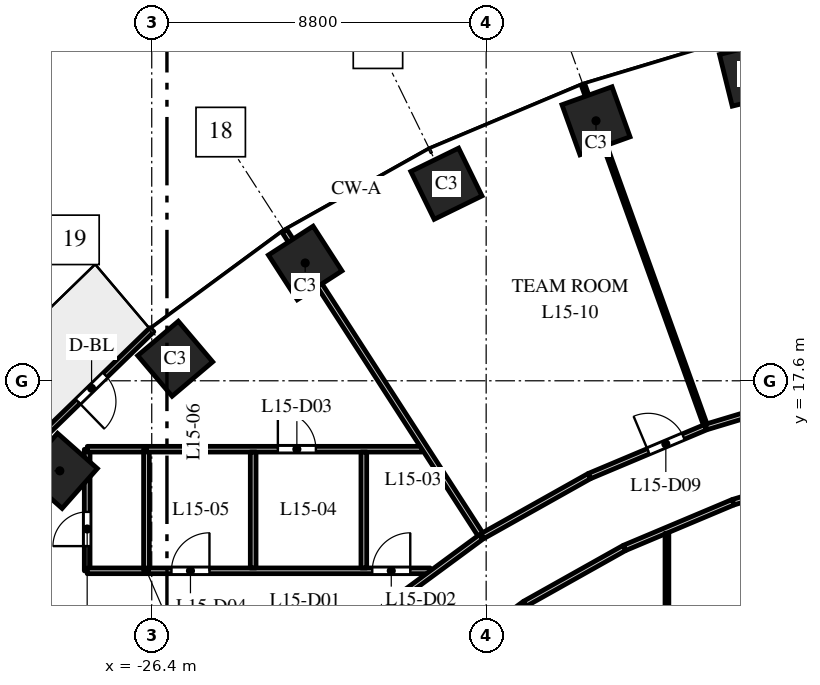
"""IFC4 building model, lengths in metres.
Left out: names, types, materials, properties, quantities, classifications, styles, units other than length and angle.
Written with IfcOpenShell. Run it as: python <this file> out.ifc"""

import sys

from ifc_helpers import new_model, si_unit, direction, frame, frame_2d, origin, origin_2d, place, context, subcontext, project, spatial, rectangle, extrude, element, fill, save


model = new_model("IFC4")
c1 = context("Model", 3, precision=1e-05, world=origin(), true_north=direction((0.0, 1.0)))
c2 = subcontext(c1, "Body", "Model", "MODEL_VIEW")
j1 = project(units=[si_unit("LENGTHUNIT", "METRE"), si_unit("PLANEANGLEUNIT", "RADIAN")], contexts=[c1])
p1 = place(None, origin())
s1 = spatial("IfcSite", under=j1, at=p1, CompositionType="ELEMENT")
p2 = place(p1, origin())
s2 = spatial("IfcBuilding", under=s1, at=p2, CompositionType="ELEMENT")
p3 = place(p2, frame((0.0, 0.0, 70.5)))
s3 = spatial("IfcBuildingStorey", under=s2, at=p3, CompositionType="ELEMENT", Elevation=70.5)
for number, where, z_axis, x_axis in (
    (1, (-10.613, 25.674, 0.0), (0.0, 0.0, 1.0), (-0.971, -0.24, 0.0)),
    (2, (-14.709, 24.441, 0.0), (0.0, 0.0, 1.0), (-0.941, -0.338, 0.0)),
    (3, (-18.646, 22.785, 0.0), (0.0, 0.0, 1.0), (-0.898, -0.439, 0.0)),
    (4, (-22.362, 20.7, 0.0), (0.0, 0.0, 1.0), (-0.84, -0.542, 0.0)),
    (5, (-25.783, 18.18, 0.0), (0.0, 0.0, 1.0), (-0.763, -0.646, 0.0)),
    (6, (-28.819, 15.23, 0.0), (0.0, 0.0, 1.0), (-0.663, -0.749, 0.0)),
):
    element("IfcColumn", number, at=place(p3, frame(where, z_axis=z_axis, x_axis=x_axis)), inside=s3, PredefinedType="COLUMN", context=c2, shape_type="SweptSolid", body=[
        extrude(rectangle(XDim=1.4, YDim=1.4, at=origin_2d()), origin(), (0.0, 0.0, 1.0), 4.0),
    ])
p4 = place(p3, frame((-26.396, 18.943, 0.0), z_axis=(0.0, 0.0, 1.0), x_axis=(-0.717214761864, -0.696852197647, 0.0)))
e7 = element("IfcWall", 7, at=p4, inside=s3, PredefinedType="STANDARD", context=c2, shape_type="SweptSolid", body=[
    extrude(rectangle(XDim=4.424, YDim=0.15, at=frame_2d((2.212, 0.0))), origin(), (0.0, 0.0, 1.0), 3.7),
])
p5 = place(p4, frame((1.712, 0.0, 0.0)))
e8 = element("IfcOpeningElement", 8, at=p5, cuts=e7, PredefinedType="OPENING", context=c2, shape_type="SweptSolid", body=[
    extrude(rectangle(XDim=1.0, YDim=2.4, at=frame_2d((0.5, 1.2))), frame((0.0, 0.085, 0.0), z_axis=(0.0, -1.0, 0.0), x_axis=(1.0, 0.0, 0.0)), (0.0, 0.0, 1.0), 0.17),
])
p6 = place(p3, frame((-28.099, 12.6, 0.0), z_axis=(0.0, 0.0, 1.0), x_axis=(0.0, 1.0, 0.0)))
e9 = element("IfcWall", 9, at=p6, inside=s3, PredefinedType="PARTITIONING", context=c2, shape_type="SweptSolid", body=[
    extrude(rectangle(XDim=3.196, YDim=0.15, at=frame_2d((1.598, 0.0))), origin(), (0.0, 0.0, 1.0), 2.85),
])
p7 = place(p6, frame((0.65, 0.0, 0.0)))
e10 = element("IfcOpeningElement", 10, at=p7, cuts=e9, PredefinedType="OPENING", context=c2, shape_type="SweptSolid", body=[
    extrude(rectangle(XDim=0.9, YDim=2.1, at=frame_2d((0.45, 1.05))), frame((0.0, 0.085, 0.0), z_axis=(0.0, -1.0, 0.0), x_axis=(1.0, 0.0, 0.0)), (0.0, 0.0, 1.0), 0.17),
])
p8 = place(p3, frame((-28.099, 12.6, 0.0), z_axis=(0.0, 0.0, 1.0), x_axis=(1.0, 0.0, 0.0)))
e11 = element("IfcWall", 11, at=p8, inside=s3, PredefinedType="PARTITIONING", context=c2, shape_type="SweptSolid", body=[
    extrude(rectangle(XDim=1.56, YDim=0.15, at=frame_2d((0.78, 0.0))), origin(), (0.0, 0.0, 1.0), 3.7),
])
p9 = place(p3, frame((-28.095, 15.8, 0.0), z_axis=(0.0, 0.0, 1.0), x_axis=(1.0, 0.0, 0.0)))
e12 = element("IfcWall", 12, at=p9, inside=s3, PredefinedType="PARTITIONING", context=c2, shape_type="SweptSolid", body=[
    extrude(rectangle(XDim=1.556, YDim=0.15, at=frame_2d((0.778, 0.0))), origin(), (0.0, 0.0, 1.0), 2.85),
])
p10 = place(p3, frame((-26.539, 12.6, 0.0), z_axis=(0.0, 0.0, 1.0), x_axis=(0.0, 1.0, 0.0)))
e13 = element("IfcWall", 13, at=p10, inside=s3, PredefinedType="PARTITIONING", context=c2, shape_type="SweptSolid", body=[
    extrude(rectangle(XDim=3.2, YDim=0.15, at=frame_2d((1.6, 0.0))), origin(), (0.0, 0.0, 1.0), 3.7),
])
p11 = place(p3, frame((-26.539, 12.6, 0.0), z_axis=(0.0, 0.0, 1.0), x_axis=(1.0, 0.0, 0.0)))
e14 = element("IfcWall", 14, at=p11, inside=s3, PredefinedType="PARTITIONING", context=c2, shape_type="SweptSolid", body=[
    extrude(rectangle(XDim=7.466, YDim=0.15, at=frame_2d((3.733, 0.0))), origin(), (0.0, 0.0, 1.0), 3.7),
])
p12 = place(p11, frame((5.942, 0.0, 0.0)))
e15 = element("IfcOpeningElement", 15, at=p12, cuts=e14, PredefinedType="OPENING", context=c2, shape_type="SweptSolid", body=[
    extrude(rectangle(XDim=1.0, YDim=2.1, at=frame_2d((0.5, 1.05))), frame((0.0, 0.085, 0.0), z_axis=(0.0, -1.0, 0.0), x_axis=(1.0, 0.0, 0.0)), (0.0, 0.0, 1.0), 0.17),
])
p13 = place(p11, frame((0.658, 0.0, 0.0)))
e16 = element("IfcOpeningElement", 16, at=p13, cuts=e14, PredefinedType="OPENING", context=c2, shape_type="SweptSolid", body=[
    extrude(rectangle(XDim=1.0, YDim=2.1, at=frame_2d((0.5, 1.05))), frame((0.0, 0.085, 0.0), z_axis=(0.0, -1.0, 0.0), x_axis=(1.0, 0.0, 0.0)), (0.0, 0.0, 1.0), 0.17),
])
p14 = place(p3, frame((-26.539, 15.8, 0.0), z_axis=(0.0, 0.0, 1.0), x_axis=(1.0, 0.0, 0.0)))
e17 = element("IfcWall", 17, at=p14, inside=s3, PredefinedType="PARTITIONING", context=c2, shape_type="SweptSolid", body=[
    extrude(rectangle(XDim=7.247, YDim=0.15, at=frame_2d((3.624, 0.0))), origin(), (0.0, 0.0, 1.0), 2.75),
])
p15 = place(p14, frame((3.458, 0.0, 0.0)))
e18 = element("IfcOpeningElement", 18, at=p15, cuts=e17, PredefinedType="OPENING", context=c2, shape_type="SweptSolid", body=[
    extrude(rectangle(XDim=1.0, YDim=2.1, at=frame_2d((0.5, 1.05))), frame((0.0, 0.085, 0.0), z_axis=(0.0, -1.0, 0.0), x_axis=(1.0, 0.0, 0.0)), (0.0, 0.0, 1.0), 0.17),
])
p16 = place(p3, frame((-23.731, 12.675, 0.0), z_axis=(0.0, 0.0, 1.0), x_axis=(0.0, 1.0, 0.0)))
e19 = element("IfcWall", 19, at=p16, inside=s3, PredefinedType="PARTITIONING", context=c2, shape_type="SweptSolid", body=[
    extrude(rectangle(XDim=3.05, YDim=0.15, at=frame_2d((1.525, 0.0))), origin(), (0.0, 0.0, 1.0), 3.7),
])
p17 = place(p3, frame((-22.905, 21.542, 0.0), z_axis=(0.0, 0.0, 1.0), x_axis=(0.542244314938, -0.840220865557, 0.0)))
e20 = element("IfcWall", 20, at=p17, inside=s3, PredefinedType="PARTITIONING", context=c2, shape_type="SweptSolid", body=[
    extrude(rectangle(XDim=9.564, YDim=0.15, at=frame_2d((4.782, 0.0))), origin(), (0.0, 0.0, 1.0), 2.85),
])
p18 = place(p3, frame((-21.135, 10.775, 0.0), z_axis=(0.0, 0.0, 1.0), x_axis=(0.717043956417, 0.697027951065, 0.0)))
e21 = element("IfcWall", 21, at=p18, inside=s3, PredefinedType="PARTITIONING", context=c2, shape_type="SweptSolid", body=[
    extrude(rectangle(XDim=1.244, YDim=0.15, at=frame_2d((0.622, 0.0))), origin(), (0.0, 0.0, 1.0), 3.7),
])
p19 = place(p3, frame((-20.819, 12.675, 0.0), z_axis=(0.0, 0.0, 1.0), x_axis=(0.0, 1.0, 0.0)))
e22 = element("IfcWall", 22, at=p19, inside=s3, PredefinedType="PARTITIONING", context=c2, shape_type="SweptSolid", body=[
    extrude(rectangle(XDim=3.05, YDim=0.15, at=frame_2d((1.525, 0.0))), origin(), (0.0, 0.0, 1.0), 2.75),
])
p20 = place(p3, frame((-20.243, 11.642, 0.0), z_axis=(0.0, 0.0, 1.0), x_axis=(0.805148342369, 0.593073475027, 0.0)))
e23 = element("IfcWall", 23, at=p20, inside=s3, PredefinedType="PARTITIONING", context=c2, shape_type="SweptSolid", body=[
    extrude(rectangle(XDim=3.117, YDim=0.15, at=frame_2d((1.559, 0.0))), origin(), (0.0, 0.0, 1.0), 2.75),
])
p21 = place(p3, frame((-18.083, 10.625, 0.0), z_axis=(0.0, 0.0, 1.0), x_axis=(0.805150898842, 0.593070004379, 0.0)))
e24 = element("IfcWall", 24, at=p21, inside=s3, PredefinedType="PARTITIONING", context=c2, shape_type="SweptSolid", body=[
    extrude(rectangle(XDim=1.872, YDim=0.15, at=frame_2d((0.936, 0.0))), origin(), (0.0, 0.0, 1.0), 2.75),
])
p22 = place(p3, frame((-17.699, 13.513, 0.0), z_axis=(0.0, 0.0, 1.0), x_axis=(0.872072163686, 0.489377299559, 0.0)))
e25 = element("IfcWall", 25, at=p22, inside=s3, PredefinedType="PARTITIONING", context=c2, shape_type="SweptSolid", body=[
    extrude(rectangle(XDim=3.227, YDim=0.15, at=frame_2d((1.613, 0.0))), origin(), (0.0, 0.0, 1.0), 3.7),
])
p23 = place(p3, frame((-16.576, 11.735, 0.0), z_axis=(0.0, 0.0, 1.0), x_axis=(0.872164226045, 0.489213207924, 0.0)))
e26 = element("IfcWall", 26, at=p23, inside=s3, PredefinedType="PARTITIONING", context=c2, shape_type="SweptSolid", body=[
    extrude(rectangle(XDim=2.998, YDim=0.15, at=frame_2d((1.499, 0.0))), origin(), (0.0, 0.0, 1.0), 2.75),
])
p24 = place(p3, frame((-15.048, 25.383, 0.0), z_axis=(0.0, 0.0, 1.0), x_axis=(0.338338680362, -0.941024408488, 0.0)))
e27 = element("IfcWall", 27, at=p24, inside=s3, PredefinedType="PARTITIONING", context=c2, shape_type="SweptSolid", body=[
    extrude(rectangle(XDim=9.559, YDim=0.1, at=frame_2d((4.779, 0.0))), origin(), (0.0, 0.0, 1.0), 2.85),
])
p25 = place(p3, frame((-14.885, 15.092, 0.0), z_axis=(0.0, 0.0, 1.0), x_axis=(0.921844706698, 0.387559462189, 0.0)))
e28 = element("IfcWall", 28, at=p25, inside=s3, PredefinedType="PARTITIONING", context=c2, shape_type="SweptSolid", body=[
    extrude(rectangle(XDim=3.313, YDim=0.15, at=frame_2d((1.656, 0.0))), origin(), (0.0, 0.0, 1.0), 2.85),
])
p26 = place(p25, frame((1.684, 0.0, 0.0)))
e29 = element("IfcOpeningElement", 29, at=p26, cuts=e28, PredefinedType="OPENING", context=c2, shape_type="SweptSolid", body=[
    extrude(rectangle(XDim=1.0, YDim=2.1, at=frame_2d((0.5, 1.05))), frame((0.0, 0.085, 0.0), z_axis=(0.0, -1.0, 0.0), x_axis=(1.0, 0.0, 0.0)), (0.0, 0.0, 1.0), 0.17),
])
p27 = place(p3, frame((-13.961, 13.202, 0.0), z_axis=(0.0, 0.0, 1.0), x_axis=(0.921753827375, 0.387775555857, 0.0)))
e30 = element("IfcWall", 30, at=p27, inside=s3, PredefinedType="PARTITIONING", context=c2, shape_type="SweptSolid", body=[
    extrude(rectangle(XDim=3.103, YDim=0.15, at=frame_2d((1.551, 0.0))), origin(), (0.0, 0.0, 1.0), 2.85),
])
p28 = place(p3, frame((-12.843, -13.587, 0.0), z_axis=(0.0, 0.0, 1.0), x_axis=(0.0, 1.0, 0.0)))
e31 = element("IfcWall", 31, at=p28, inside=s3, PredefinedType="PARTITIONING", context=c2, shape_type="SweptSolid", body=[
    extrude(rectangle(XDim=27.174, YDim=0.1, at=frame_2d((13.587, 0.0))), origin(), (0.0, 0.0, 1.0), 2.75),
])
p29 = place(p3, frame((-11.812, 16.384, 0.0), z_axis=(0.0, 0.0, 1.0), x_axis=(0.95754884035, 0.28827108482, 0.0)))
e32 = element("IfcWall", 32, at=p29, inside=s3, PredefinedType="PARTITIONING", context=c2, shape_type="SweptSolid", body=[
    extrude(rectangle(XDim=3.396, YDim=0.15, at=frame_2d((1.698, 0.0))), origin(), (0.0, 0.0, 1.0), 3.7),
])
p30 = place(p3, frame((-11.101, 14.405, 0.0), z_axis=(0.0, 0.0, 1.0), x_axis=(0.957612601062, 0.28805920622, 0.0)))
e33 = element("IfcWall", 33, at=p30, inside=s3, PredefinedType="PARTITIONING", context=c2, shape_type="SweptSolid", body=[
    extrude(rectangle(XDim=3.18, YDim=0.15, at=frame_2d((1.59, 0.0))), origin(), (0.0, 0.0, 1.0), 3.7),
])
p31 = place(p30, frame((1.65, 0.0, 0.0)))
e34 = element("IfcOpeningElement", 34, at=p31, cuts=e33, PredefinedType="OPENING", context=c2, shape_type="SweptSolid", body=[
    extrude(rectangle(XDim=1.0, YDim=2.1, at=frame_2d((0.5, 1.05))), frame((0.0, 0.085, 0.0), z_axis=(0.0, -1.0, 0.0), x_axis=(1.0, 0.0, 0.0)), (0.0, 0.0, 1.0), 0.17),
])
p32 = place(p5, origin())
e35 = element("IfcDoor", 35, at=p32, inside=s3, OperationType="SINGLE_SWING_RIGHT", PredefinedType="DOOR", context=c2, shape_type="SweptSolid", body=[
    extrude(rectangle(XDim=1.0, YDim=2.4, at=frame_2d((0.5, 1.2))), frame((0.0, 0.025, 0.0), z_axis=(0.0, -1.0, 0.0), x_axis=(1.0, 0.0, 0.0)), (0.0, 0.0, 1.0), 0.05),
])
fill(e8, e35)
p33 = place(p12, origin())
e36 = element("IfcDoor", 36, at=p33, inside=s3, OperationType="SINGLE_SWING_RIGHT", PredefinedType="DOOR", context=c2, shape_type="SweptSolid", body=[
    extrude(rectangle(XDim=1.0, YDim=2.1, at=frame_2d((0.5, 1.05))), frame((0.0, 0.025, 0.0), z_axis=(0.0, -1.0, 0.0), x_axis=(1.0, 0.0, 0.0)), (0.0, 0.0, 1.0), 0.05),
])
fill(e15, e36)
p34 = place(p15, origin())
e37 = element("IfcDoor", 37, at=p34, inside=s3, OperationType="SINGLE_SWING_LEFT", PredefinedType="DOOR", context=c2, shape_type="SweptSolid", body=[
    extrude(rectangle(XDim=1.0, YDim=2.1, at=frame_2d((0.5, 1.05))), frame((0.0, 0.025, 0.0), z_axis=(0.0, -1.0, 0.0), x_axis=(1.0, 0.0, 0.0)), (0.0, 0.0, 1.0), 0.05),
])
fill(e18, e37)
p35 = place(p13, origin())
e38 = element("IfcDoor", 38, at=p35, inside=s3, OperationType="SINGLE_SWING_RIGHT", PredefinedType="DOOR", context=c2, shape_type="SweptSolid", body=[
    extrude(rectangle(XDim=1.0, YDim=2.1, at=frame_2d((0.5, 1.05))), frame((0.0, 0.025, 0.0), z_axis=(0.0, -1.0, 0.0), x_axis=(1.0, 0.0, 0.0)), (0.0, 0.0, 1.0), 0.05),
])
fill(e16, e38)
p36 = place(p7, origin())
e39 = element("IfcDoor", 39, at=p36, inside=s3, OperationType="SINGLE_SWING_LEFT", PredefinedType="DOOR", context=c2, shape_type="SweptSolid", body=[
    extrude(rectangle(XDim=0.9, YDim=2.1, at=frame_2d((0.45, 1.05))), frame((0.0, 0.025, 0.0), z_axis=(0.0, -1.0, 0.0), x_axis=(1.0, 0.0, 0.0)), (0.0, 0.0, 1.0), 0.05),
])
fill(e10, e39)
p37 = place(p26, origin())
e40 = element("IfcDoor", 40, at=p37, inside=s3, OperationType="SINGLE_SWING_LEFT", PredefinedType="DOOR", context=c2, shape_type="SweptSolid", body=[
    extrude(rectangle(XDim=1.0, YDim=2.1, at=frame_2d((0.5, 1.05))), frame((0.0, 0.025, 0.0), z_axis=(0.0, -1.0, 0.0), x_axis=(1.0, 0.0, 0.0)), (0.0, 0.0, 1.0), 0.05),
])
fill(e29, e40)
save(model, sys.argv[1])
